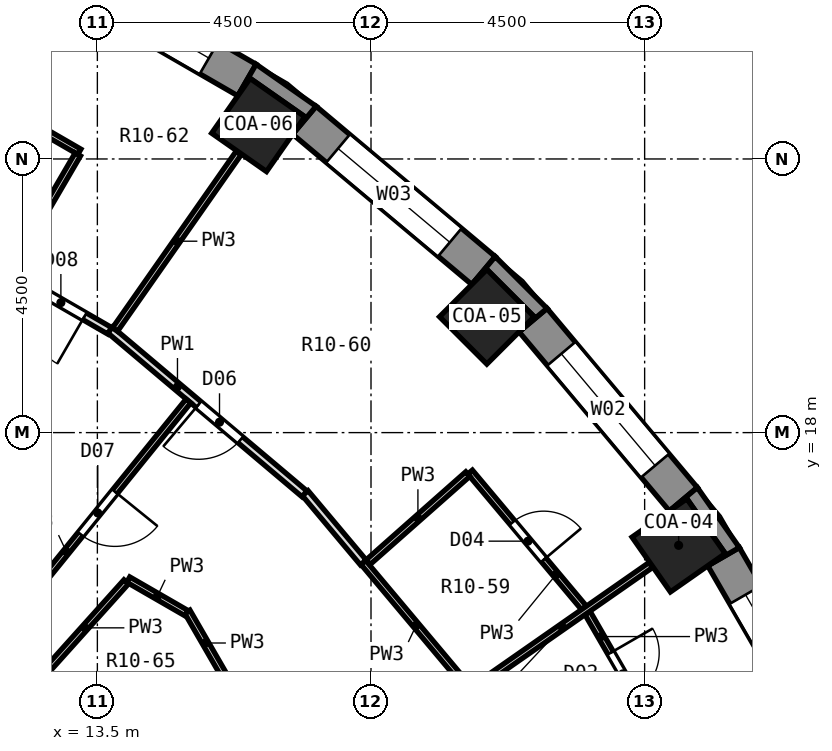
"""IFC4 building model, lengths in metres.
Left out: names, types, materials, properties, quantities, classifications, styles, units other than length and angle.
Written with IfcOpenShell. Run it as: python <this file> out.ifc"""

import sys

from ifc_helpers import new_model, si_unit, direction, frame, frame_2d, origin, origin_2d, place, context, subcontext, project, spatial, polyline, rectangle, outline, extrude, element, fill, save


model = new_model("IFC4")
c1 = context("Model", 3, precision=1e-05, world=origin(), true_north=direction((0.0, 1.0)))
c2 = subcontext(c1, "Body", "Model", "MODEL_VIEW")
j1 = project(units=[si_unit("LENGTHUNIT", "METRE"), si_unit("PLANEANGLEUNIT", "RADIAN")], contexts=[c1])
p1 = place(None, origin())
s1 = spatial("IfcSite", under=j1, at=p1, CompositionType="ELEMENT")
p2 = place(p1, origin())
s2 = spatial("IfcBuilding", under=s1, at=p2, CompositionType="ELEMENT")
p3 = place(p2, frame((0.0, 0.0, 36.2)))
s3 = spatial("IfcBuildingStorey", under=s2, at=p3, CompositionType="ELEMENT", Elevation=36.2)
for number, where, z_axis, x_axis in (
    (1, (23.059, 16.146, 0.0), (0.0, 0.0, 1.0), (0.819, 0.574, 0.0)),
    (2, (19.905, 19.905, 0.0), (0.0, 0.0, 1.0), (0.707, 0.707, 0.0)),
    (3, (16.146, 23.059, 0.0), (0.0, 0.0, 1.0), (0.574, 0.819, 0.0)),
):
    element("IfcColumn", number, at=place(p3, frame(where, z_axis=z_axis, x_axis=x_axis)), inside=s3, PredefinedType="COLUMN", context=c2, shape_type="SweptSolid", body=[
        extrude(rectangle(XDim=1.1, YDim=1.1, at=origin_2d()), origin(), (0.0, 0.0, 1.0), 3.3),
    ])
p4 = place(p3, frame((25.721, 12.63, 0.0), z_axis=(0.0, 0.0, 1.0), x_axis=(-0.499989888488, 0.86603124159, 0.0)))
e4 = element("IfcWall", 4, at=p4, inside=s3, PredefinedType="SOLIDWALL", context=c2, shape_type="SweptSolid", body=[
    extrude(rectangle(XDim=3.846, YDim=0.6, at=frame_2d((1.923, 0.0))), origin(), (0.0, 0.0, 1.0), 2.75),
])
p5 = place(p4, frame((0.723, 0.0, 0.9)))
e5 = element("IfcOpeningElement", 5, at=p5, cuts=e4, PredefinedType="OPENING", context=c2, shape_type="SweptSolid", body=[
    extrude(rectangle(XDim=2.4, YDim=1.8, at=frame_2d((1.2, 0.9))), frame((0.0, 0.312, 0.0), z_axis=(0.0, -1.0, 0.0), x_axis=(1.0, 0.0, 0.0)), (0.0, 0.0, 1.0), 0.624),
])
p6 = place(p3, frame((23.137, 16.904, 0.0), z_axis=(0.0, 0.0, 1.0), x_axis=(-0.642809392687, 0.766026164483, 0.0)))
e6 = element("IfcWall", 6, at=p6, inside=s3, PredefinedType="SOLIDWALL", context=c2, shape_type="SweptSolid", body=[
    extrude(rectangle(XDim=3.846, YDim=0.6, at=frame_2d((1.923, 0.0))), origin(), (0.0, 0.0, 1.0), 2.75),
])
p7 = place(p6, frame((0.723, 0.0, 0.9)))
e7 = element("IfcOpeningElement", 7, at=p7, cuts=e6, PredefinedType="OPENING", context=c2, shape_type="SweptSolid", body=[
    extrude(rectangle(XDim=2.4, YDim=1.8, at=frame_2d((1.2, 0.9))), frame((0.0, 0.312, 0.0), z_axis=(0.0, -1.0, 0.0), x_axis=(1.0, 0.0, 0.0)), (0.0, 0.0, 1.0), 0.624),
])
p8 = place(p3, frame((19.85, 20.665, 0.0), z_axis=(0.0, 0.0, 1.0), x_axis=(-0.766026164483, 0.642809392687, 0.0)))
e8 = element("IfcWall", 8, at=p8, inside=s3, PredefinedType="SOLIDWALL", context=c2, shape_type="SweptSolid", body=[
    extrude(rectangle(XDim=3.846, YDim=0.6, at=frame_2d((1.923, 0.0))), origin(), (0.0, 0.0, 1.0), 2.75),
])
p9 = place(p8, frame((0.723, 0.0, 0.9)))
e9 = element("IfcOpeningElement", 9, at=p9, cuts=e8, PredefinedType="OPENING", context=c2, shape_type="SweptSolid", body=[
    extrude(rectangle(XDim=2.4, YDim=1.8, at=frame_2d((1.2, 0.9))), frame((0.0, 0.312, 0.0), z_axis=(0.0, -1.0, 0.0), x_axis=(1.0, 0.0, 0.0)), (0.0, 0.0, 1.0), 0.624),
])
p10 = place(p3, frame((15.96, 23.798, 0.0), z_axis=(0.0, 0.0, 1.0), x_axis=(-0.86603124159, 0.499989888488, 0.0)))
e10 = element("IfcWall", 10, at=p10, inside=s3, PredefinedType="SOLIDWALL", context=c2, shape_type="SweptSolid", body=[
    extrude(rectangle(XDim=3.846, YDim=0.6, at=frame_2d((1.923, 0.0))), origin(), (0.0, 0.0, 1.0), 2.75),
])
p11 = place(p10, frame((0.723, 0.0, 0.9)))
e11 = element("IfcOpeningElement", 11, at=p11, cuts=e10, PredefinedType="OPENING", context=c2, shape_type="SweptSolid", body=[
    extrude(rectangle(XDim=2.4, YDim=1.8, at=frame_2d((1.2, 0.9))), frame((0.0, 0.312, 0.0), z_axis=(0.0, -1.0, 0.0), x_axis=(1.0, 0.0, 0.0)), (0.0, 0.0, 1.0), 0.624),
])
p12 = place(p3, origin())
e12 = element("IfcWall", 12, at=p12, inside=s3, PredefinedType="SOLIDWALL", context=c2, shape_type="SweptSolid", body=[
    extrude(outline(polyline([(24.058, 16.11), (23.367, 17.097), (22.907, 16.711), (23.194, 16.912), (23.825, 16.011), (23.538, 15.81), (24.058, 16.11)])), origin(), (0.0, 0.0, 1.0), 2.75),
])
p13 = place(p3, origin())
e13 = element("IfcWall", 13, at=p13, inside=s3, PredefinedType="SOLIDWALL", context=c2, shape_type="SweptSolid", body=[
    extrude(outline(polyline([(20.043, 20.895), (19.657, 20.435), (19.905, 20.683), (20.683, 19.905), (20.435, 19.657), (20.895, 20.043), (20.043, 20.895)])), origin(), (0.0, 0.0, 1.0), 2.75),
])
p14 = place(p3, origin())
e14 = element("IfcWall", 14, at=p14, inside=s3, PredefinedType="SOLIDWALL", context=c2, shape_type="SweptSolid", body=[
    extrude(outline(polyline([(17.097, 23.367), (16.11, 24.058), (15.81, 23.538), (16.011, 23.825), (16.912, 23.194), (16.711, 22.907), (17.097, 23.367)])), origin(), (0.0, 0.0, 1.0), 2.75),
])
p15 = place(p3, frame((14.978, 15.057, 0.0), z_axis=(0.0, 0.0, 1.0), x_axis=(0.500342374835, -0.865827643324, 0.0)))
e15 = element("IfcWall", 15, at=p15, inside=s3, PredefinedType="PARTITIONING", context=c2, shape_type="SweptSolid", body=[
    extrude(rectangle(XDim=1.193, YDim=0.1, at=frame_2d((0.597, 0.0))), origin(), (0.0, 0.0, 1.0), 2.75),
])
p16 = place(p3, frame((21.56, 15.036, 0.0), z_axis=(0.0, 0.0, 1.0), x_axis=(0.499987246797, -0.866032766724, 0.0)))
e16 = element("IfcWall", 16, at=p16, inside=s3, PredefinedType="PARTITIONING", context=c2, shape_type="SweptSolid", body=[
    extrude(rectangle(XDim=2.368, YDim=0.1, at=frame_2d((1.184, 0.0))), origin(), (0.0, 0.0, 1.0), 2.75),
])
p17 = place(p16, frame((0.759, 0.0, 0.0)))
e17 = element("IfcOpeningElement", 17, at=p17, cuts=e16, PredefinedType="OPENING", context=c2, shape_type="SweptSolid", body=[
    extrude(rectangle(XDim=0.8, YDim=2.1, at=frame_2d((0.4, 1.05))), frame((0.0, 0.062, 0.0), z_axis=(0.0, -1.0, 0.0), x_axis=(1.0, 0.0, 0.0)), (0.0, 0.0, 1.0), 0.124),
])
p18 = place(p3, frame((17.873, 15.865, 0.0), z_axis=(0.0, 0.0, 1.0), x_axis=(0.642870303164, -0.765975047446, 0.0)))
e18 = element("IfcWall", 18, at=p18, inside=s3, PredefinedType="PARTITIONING", context=c2, shape_type="SweptSolid", body=[
    extrude(rectangle(XDim=2.705, YDim=0.1, at=frame_2d((1.353, 0.0))), origin(), (0.0, 0.0, 1.0), 2.75),
])
p19 = place(p3, frame((16.916, 17.006, 0.0), z_axis=(0.0, 0.0, 1.0), x_axis=(0.642649535047, -0.766160280297, 0.0)))
e19 = element("IfcWall", 19, at=p19, inside=s3, PredefinedType="PARTITIONING", context=c2, shape_type="SweptSolid", body=[
    extrude(rectangle(XDim=1.489, YDim=0.125, at=frame_2d((0.744, 0.0))), origin(), (0.0, 0.0, 1.0), 2.75),
])
p20 = place(p3, frame((19.629, 17.351, 0.0), z_axis=(0.0, 0.0, 1.0), x_axis=(0.642701049916, -0.766117067057, 0.0)))
e20 = element("IfcWall", 20, at=p20, inside=s3, PredefinedType="PARTITIONING", context=c2, shape_type="SweptSolid", body=[
    extrude(rectangle(XDim=2.916, YDim=0.1, at=frame_2d((1.458, 0.0))), origin(), (0.0, 0.0, 1.0), 2.75),
])
p21 = place(p20, frame((1.083, 0.0, 0.0)))
e21 = element("IfcOpeningElement", 21, at=p21, cuts=e20, PredefinedType="OPENING", context=c2, shape_type="SweptSolid", body=[
    extrude(rectangle(XDim=0.8, YDim=2.1, at=frame_2d((0.4, 1.05))), frame((0.0, 0.062, 0.0), z_axis=(0.0, -1.0, 0.0), x_axis=(1.0, 0.0, 0.0)), (0.0, 0.0, 1.0), 0.124),
])
p22 = place(p3, frame((13.709, 19.689, 0.0), z_axis=(0.0, 0.0, 1.0), x_axis=(0.764384092804, -0.644761164051, 0.0)))
e22 = element("IfcWall", 22, at=p22, inside=s3, PredefinedType="PARTITIONING", context=c2, shape_type="SweptSolid", body=[
    extrude(rectangle(XDim=4.182, YDim=0.125, at=frame_2d((2.091, 0.0))), origin(), (0.0, 0.0, 1.0), 2.75),
])
p23 = place(p22, frame((1.904, 0.0, 0.0)))
e23 = element("IfcOpeningElement", 23, at=p23, cuts=e22, PredefinedType="OPENING", context=c2, shape_type="SweptSolid", body=[
    extrude(rectangle(XDim=0.9, YDim=2.1, at=frame_2d((0.45, 1.05))), frame((0.0, 0.074, 0.0), z_axis=(0.0, -1.0, 0.0), x_axis=(1.0, 0.0, 0.0)), (0.0, 0.0, 1.0), 0.149),
])
p24 = place(p3, frame((4.867, 18.436, 0.0), z_axis=(0.0, 0.0, 1.0), x_axis=(0.86605048973, -0.49995654735, 0.0)))
e24 = element("IfcWall", 24, at=p24, inside=s3, PredefinedType="PARTITIONING", context=c2, shape_type="SweptSolid", body=[
    extrude(rectangle(XDim=9.871, YDim=0.125, at=frame_2d((4.935, 0.0))), origin(), (0.0, 0.0, 1.0), 2.75),
])
p25 = place(p3, frame((14.008, 15.583, 0.0), z_axis=(0.0, 0.0, 1.0), x_axis=(0.866288740656, -0.49954360952, 0.0)))
e25 = element("IfcWall", 25, at=p25, inside=s3, PredefinedType="PARTITIONING", context=c2, shape_type="SweptSolid", body=[
    extrude(rectangle(XDim=1.103, YDim=0.1, at=frame_2d((0.552, 0.0))), origin(), (0.0, 0.0, 1.0), 2.75),
])
p26 = place(p3, frame((12.088, 20.606, 0.0), z_axis=(0.0, 0.0, 1.0), x_axis=(0.866104801807, -0.499862453367, 0.0)))
e26 = element("IfcWall", 26, at=p26, inside=s3, PredefinedType="PARTITIONING", context=c2, shape_type="SweptSolid", body=[
    extrude(rectangle(XDim=1.862, YDim=0.125, at=frame_2d((0.931, 0.0))), origin(), (0.0, 0.0, 1.0), 2.75),
])
p27 = place(p26, frame((0.487, 0.0, 0.0)))
e27 = element("IfcOpeningElement", 27, at=p27, cuts=e26, PredefinedType="OPENING", context=c2, shape_type="SweptSolid", body=[
    extrude(rectangle(XDim=0.9, YDim=2.1, at=frame_2d((0.45, 1.05))), frame((0.0, 0.074, 0.0), z_axis=(0.0, -1.0, 0.0), x_axis=(1.0, 0.0, 0.0)), (0.0, 0.0, 1.0), 0.149),
])
p28 = place(p3, frame((11.154, 23.802, 0.0), z_axis=(0.0, 0.0, 1.0), x_axis=(0.865910737143, -0.500198555877, 0.0)))
e28 = element("IfcWall", 28, at=p28, inside=s3, PredefinedType="PARTITIONING", context=c2, shape_type="SweptSolid", body=[
    extrude(rectangle(XDim=2.367, YDim=0.1, at=frame_2d((1.184, 0.0))), origin(), (0.0, 0.0, 1.0), 2.75),
])
p29 = place(p28, frame((0.759, 0.0, 0.0)))
e29 = element("IfcOpeningElement", 29, at=p29, cuts=e28, PredefinedType="OPENING", context=c2, shape_type="SweptSolid", body=[
    extrude(rectangle(XDim=0.8, YDim=2.1, at=frame_2d((0.4, 1.05))), frame((0.0, 0.062, 0.0), z_axis=(0.0, -1.0, 0.0), x_axis=(1.0, 0.0, 0.0)), (0.0, 0.0, 1.0), 0.124),
])
p30 = place(p3, frame((19.683, 13.787, 0.0), z_axis=(0.0, 0.0, 1.0), x_axis=(0.820194321254, 0.57208502461, 0.0)))
e30 = element("IfcWall", 30, at=p30, inside=s3, PredefinedType="PARTITIONING", context=c2, shape_type="SweptSolid", body=[
    extrude(rectangle(XDim=3.559, YDim=0.1, at=frame_2d((1.78, 0.0))), origin(), (0.0, 0.0, 1.0), 2.75),
])
p31 = place(p3, frame((17.952, 15.868, 0.0), z_axis=(0.0, 0.0, 1.0), x_axis=(0.749222226859, 0.662318695781, 0.0)))
e31 = element("IfcWall", 31, at=p31, inside=s3, PredefinedType="PARTITIONING", context=c2, shape_type="SweptSolid", body=[
    extrude(rectangle(XDim=2.188, YDim=0.1, at=frame_2d((1.094, 0.0))), origin(), (0.0, 0.0, 1.0), 2.75),
])
p32 = place(p3, frame((12.616, 14.034, 0.0), z_axis=(0.0, 0.0, 1.0), x_axis=(0.668327519136, 0.743867143491, 0.0)))
e32 = element("IfcWall", 32, at=p32, inside=s3, PredefinedType="PARTITIONING", context=c2, shape_type="SweptSolid", body=[
    extrude(rectangle(XDim=2.033, YDim=0.1, at=frame_2d((1.017, 0.0))), origin(), (0.0, 0.0, 1.0), 2.75),
])
p33 = place(p3, frame((11.763, 14.527, 0.0), z_axis=(0.0, 0.0, 1.0), x_axis=(0.629330794749, 0.777137536592, 0.0)))
e33 = element("IfcWall", 33, at=p33, inside=s3, PredefinedType="PARTITIONING", context=c2, shape_type="SweptSolid", body=[
    extrude(rectangle(XDim=5.139, YDim=0.1, at=frame_2d((2.569, 0.0))), origin(), (0.0, 0.0, 1.0), 2.75),
])
p34 = place(p33, frame((2.32, 0.0, 0.0)))
e34 = element("IfcOpeningElement", 34, at=p34, cuts=e33, PredefinedType="OPENING", context=c2, shape_type="SweptSolid", body=[
    extrude(rectangle(XDim=0.9, YDim=2.1, at=frame_2d((0.45, 1.05))), frame((0.0, 0.062, 0.0), z_axis=(0.0, -1.0, 0.0), x_axis=(1.0, 0.0, 0.0)), (0.0, 0.0, 1.0), 0.124),
])
p35 = place(p3, frame((13.791, 19.695, 0.0), z_axis=(0.0, 0.0, 1.0), x_axis=(0.573554740156, 0.8191672357, 0.0)))
e35 = element("IfcWall", 35, at=p35, inside=s3, PredefinedType="PARTITIONING", context=c2, shape_type="SweptSolid", body=[
    extrude(rectangle(XDim=3.547, YDim=0.1, at=frame_2d((1.773, 0.0))), origin(), (0.0, 0.0, 1.0), 2.75),
])
p36 = place(p3, frame((12.076, 20.685, 0.0), z_axis=(0.0, 0.0, 1.0), x_axis=(0.503871025524, 0.863778900898, 0.0)))
e36 = element("IfcWall", 36, at=p36, inside=s3, PredefinedType="PARTITIONING", context=c2, shape_type="SweptSolid", body=[
    extrude(rectangle(XDim=2.188, YDim=0.1, at=frame_2d((1.094, 0.0))), origin(), (0.0, 0.0, 1.0), 2.75),
])
p37 = place(p5, origin())
e37 = element("IfcWindow", 37, at=p37, inside=s3, PartitioningType="SINGLE_PANEL", PredefinedType="WINDOW", context=c2, shape_type="SweptSolid", body=[
    extrude(rectangle(XDim=2.4, YDim=1.8, at=frame_2d((1.2, 0.9))), frame((0.0, 0.18, 0.0), z_axis=(0.0, -1.0, 0.0), x_axis=(1.0, 0.0, 0.0)), (0.0, 0.0, 1.0), 0.06),
])
fill(e5, e37)
p38 = place(p7, origin())
e38 = element("IfcWindow", 38, at=p38, inside=s3, PartitioningType="SINGLE_PANEL", PredefinedType="WINDOW", context=c2, shape_type="SweptSolid", body=[
    extrude(rectangle(XDim=2.4, YDim=1.8, at=frame_2d((1.2, 0.9))), frame((0.0, 0.18, 0.0), z_axis=(0.0, -1.0, 0.0), x_axis=(1.0, 0.0, 0.0)), (0.0, 0.0, 1.0), 0.06),
])
fill(e7, e38)
p39 = place(p9, origin())
e39 = element("IfcWindow", 39, at=p39, inside=s3, PartitioningType="SINGLE_PANEL", PredefinedType="WINDOW", context=c2, shape_type="SweptSolid", body=[
    extrude(rectangle(XDim=2.4, YDim=1.8, at=frame_2d((1.2, 0.9))), frame((0.0, 0.18, 0.0), z_axis=(0.0, -1.0, 0.0), x_axis=(1.0, 0.0, 0.0)), (0.0, 0.0, 1.0), 0.06),
])
fill(e9, e39)
p40 = place(p11, origin())
e40 = element("IfcWindow", 40, at=p40, inside=s3, PartitioningType="SINGLE_PANEL", PredefinedType="WINDOW", context=c2, shape_type="SweptSolid", body=[
    extrude(rectangle(XDim=2.4, YDim=1.8, at=frame_2d((1.2, 0.9))), frame((0.0, 0.18, 0.0), z_axis=(0.0, -1.0, 0.0), x_axis=(1.0, 0.0, 0.0)), (0.0, 0.0, 1.0), 0.06),
])
fill(e11, e40)
p41 = place(p17, origin())
e41 = element("IfcDoor", 41, at=p41, inside=s3, OperationType="SINGLE_SWING_LEFT", PredefinedType="DOOR", context=c2, shape_type="SweptSolid", body=[
    extrude(rectangle(XDim=0.8, YDim=2.1, at=frame_2d((0.4, 1.05))), frame((0.0, 0.025, 0.0), z_axis=(0.0, -1.0, 0.0), x_axis=(1.0, 0.0, 0.0)), (0.0, 0.0, 1.0), 0.05),
])
fill(e17, e41)
p42 = place(p21, origin())
e42 = element("IfcDoor", 42, at=p42, inside=s3, OperationType="SINGLE_SWING_RIGHT", PredefinedType="DOOR", context=c2, shape_type="SweptSolid", body=[
    extrude(rectangle(XDim=0.8, YDim=2.1, at=frame_2d((0.4, 1.05))), frame((0.0, 0.025, 0.0), z_axis=(0.0, -1.0, 0.0), x_axis=(1.0, 0.0, 0.0)), (0.0, 0.0, 1.0), 0.05),
])
fill(e21, e42)
p43 = place(p23, frame((0.9, 0.0, 0.0), z_axis=(0.0, 0.0, 1.0), x_axis=(-1.0, 0.0, 0.0)))
e43 = element("IfcDoor", 43, at=p43, inside=s3, OperationType="SINGLE_SWING_RIGHT", PredefinedType="DOOR", context=c2, shape_type="SweptSolid", body=[
    extrude(rectangle(XDim=0.9, YDim=2.1, at=frame_2d((0.45, 1.05))), frame((0.0, 0.025, 0.0), z_axis=(0.0, -1.0, 0.0), x_axis=(1.0, 0.0, 0.0)), (0.0, 0.0, 1.0), 0.05),
])
fill(e23, e43)
p44 = place(p34, frame((0.9, 0.0, 0.0), z_axis=(0.0, 0.0, 1.0), x_axis=(-1.0, 0.0, 0.0)))
e44 = element("IfcDoor", 44, at=p44, inside=s3, OperationType="SINGLE_SWING_LEFT", PredefinedType="DOOR", context=c2, shape_type="SweptSolid", body=[
    extrude(rectangle(XDim=0.9, YDim=2.1, at=frame_2d((0.45, 1.05))), frame((0.0, 0.025, 0.0), z_axis=(0.0, -1.0, 0.0), x_axis=(1.0, 0.0, 0.0)), (0.0, 0.0, 1.0), 0.05),
])
fill(e34, e44)
p45 = place(p27, frame((0.9, 0.0, 0.0), z_axis=(0.0, 0.0, 1.0), x_axis=(-1.0, 0.0, 0.0)))
e45 = element("IfcDoor", 45, at=p45, inside=s3, OperationType="SINGLE_SWING_LEFT", PredefinedType="DOOR", context=c2, shape_type="SweptSolid", body=[
    extrude(rectangle(XDim=0.9, YDim=2.1, at=frame_2d((0.45, 1.05))), frame((0.0, 0.025, 0.0), z_axis=(0.0, -1.0, 0.0), x_axis=(1.0, 0.0, 0.0)), (0.0, 0.0, 1.0), 0.05),
])
fill(e27, e45)
save(model, sys.argv[1])
